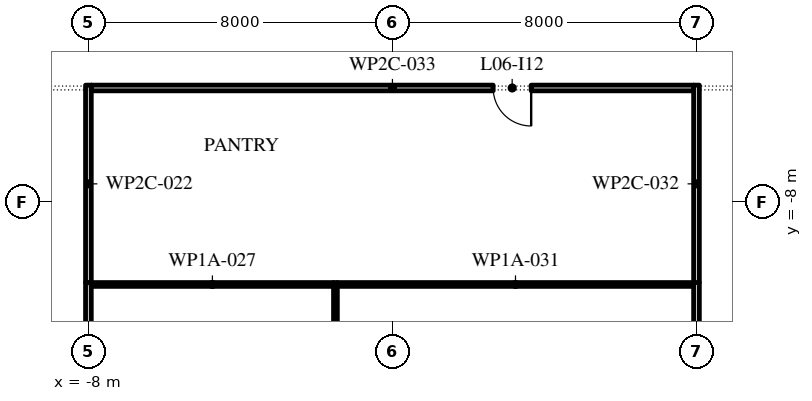
"""IFC4 building model, lengths in metres.
Left out: names, types, materials, properties, quantities, classifications, styles, units other than length and angle.
Written with IfcOpenShell. Run it as: python <this file> out.ifc"""

import sys

from ifc_helpers import new_model, si_unit, direction, frame, frame_2d, origin, place, context, subcontext, project, spatial, rectangle, extrude, element, fill, save


model = new_model("IFC4")
c1 = context("Model", 3, precision=1e-05, world=origin(), true_north=direction((0.0, 1.0)))
c2 = subcontext(c1, "Body", "Model", "MODEL_VIEW")
j1 = project(units=[si_unit("LENGTHUNIT", "METRE"), si_unit("PLANEANGLEUNIT", "RADIAN")], contexts=[c1])
p1 = place(None, origin())
s1 = spatial("IfcSite", under=j1, at=p1, CompositionType="ELEMENT")
p2 = place(p1, origin())
s2 = spatial("IfcBuilding", under=s1, at=p2, CompositionType="ELEMENT")
p3 = place(p2, frame((0.0, 0.0, 33.6)))
s3 = spatial("IfcBuildingStorey", under=s2, at=p3, CompositionType="ELEMENT", Elevation=33.6)
p4 = place(p3, frame((-8.0, -10.12, 0.0), z_axis=(0.0, 0.0, 1.0), x_axis=(0.0, -1.0, 0.0)))
e1 = element("IfcWall", 1, at=p4, inside=s3, PredefinedType="PARTITIONING", context=c2, shape_type="SweptSolid", body=[
    extrude(rectangle(XDim=7.805, YDim=0.15, at=frame_2d((3.902, 0.0))), origin(), (0.0, 0.0, 1.0), 5.8),
])
p5 = place(p4, frame((4.98, 0.0, 0.0)))
e2 = element("IfcOpeningElement", 2, at=p5, cuts=e1, PredefinedType="OPENING", context=c2, shape_type="SweptSolid", body=[
    extrude(rectangle(XDim=1.0, YDim=2.1, at=frame_2d((0.5, 1.05))), frame((0.0, 0.085, 0.0), z_axis=(0.0, -1.0, 0.0), x_axis=(1.0, 0.0, 0.0)), (0.0, 0.0, 1.0), 0.17),
])
p6 = place(p3, frame((-8.0, -4.925, 0.0), z_axis=(0.0, 0.0, 1.0), x_axis=(0.0, -1.0, 0.0)))
e3 = element("IfcWall", 3, at=p6, inside=s3, PredefinedType="PARTITIONING", context=c2, shape_type="SweptSolid", body=[
    extrude(rectangle(XDim=5.195, YDim=0.15, at=frame_2d((2.598, 0.0))), origin(), (0.0, 0.0, 1.0), 5.8),
])
p7 = place(p3, frame((-1.5, -21.95, 0.0), z_axis=(0.0, 0.0, 1.0), x_axis=(0.0, 1.0, 0.0)))
e4 = element("IfcWall", 4, at=p7, inside=s3, PredefinedType="PARTITIONING", context=c2, shape_type="SweptSolid", body=[
    extrude(rectangle(XDim=11.83, YDim=0.1, at=frame_2d((5.915, 0.0))), origin(), (0.0, 0.0, 1.0), 5.8),
])
p8 = place(p3, frame((-1.55, -10.17, 0.0), z_axis=(0.0, 0.0, 1.0), x_axis=(-1.0, 0.0, 0.0)))
e5 = element("IfcWall", 5, at=p8, inside=s3, PredefinedType="PARTITIONING", context=c2, shape_type="SweptSolid", body=[
    extrude(rectangle(XDim=6.375, YDim=0.1, at=frame_2d((3.188, 0.0))), origin(), (0.0, 0.0, 1.0), 5.8),
])
p9 = place(p3, frame((8.0, -18.075, 0.0), z_axis=(0.0, 0.0, 1.0), x_axis=(0.0, 1.0, 0.0)))
e6 = element("IfcWall", 6, at=p9, inside=s3, PredefinedType="PARTITIONING", context=c2, shape_type="SweptSolid", body=[
    extrude(rectangle(XDim=7.955, YDim=0.15, at=frame_2d((3.978, 0.0))), origin(), (0.0, 0.0, 1.0), 5.8),
])
p10 = place(p9, frame((5.005, 0.0, 0.0)))
e7 = element("IfcOpeningElement", 7, at=p10, cuts=e6, PredefinedType="OPENING", context=c2, shape_type="SweptSolid", body=[
    extrude(rectangle(XDim=1.0, YDim=2.1, at=frame_2d((0.5, 1.05))), frame((0.0, 0.085, 0.0), z_axis=(0.0, -1.0, 0.0), x_axis=(1.0, 0.0, 0.0)), (0.0, 0.0, 1.0), 0.17),
])
p11 = place(p3, frame((7.925, -10.17, 0.0), z_axis=(0.0, 0.0, 1.0), x_axis=(-1.0, 0.0, 0.0)))
e8 = element("IfcWall", 8, at=p11, inside=s3, PredefinedType="PARTITIONING", context=c2, shape_type="SweptSolid", body=[
    extrude(rectangle(XDim=9.375, YDim=0.1, at=frame_2d((4.688, 0.0))), origin(), (0.0, 0.0, 1.0), 5.8),
])
p12 = place(p3, frame((8.0, -10.12, 0.0), z_axis=(0.0, 0.0, 1.0), x_axis=(0.0, 1.0, 0.0)))
e9 = element("IfcWall", 9, at=p12, inside=s3, PredefinedType="PARTITIONING", context=c2, shape_type="SweptSolid", body=[
    extrude(rectangle(XDim=5.195, YDim=0.15, at=frame_2d((2.598, 0.0))), origin(), (0.0, 0.0, 1.0), 5.8),
])
p13 = place(p3, frame((7.925, -5.0, 0.0), z_axis=(0.0, 0.0, 1.0), x_axis=(-1.0, 0.0, 0.0)))
e10 = element("IfcWall", 10, at=p13, inside=s3, PredefinedType="PARTITIONING", context=c2, shape_type="SweptSolid", body=[
    extrude(rectangle(XDim=15.85, YDim=0.15, at=frame_2d((7.925, 0.0))), origin(), (0.0, 0.0, 1.0), 5.8),
])
p14 = place(p13, frame((4.275, 0.0, 0.0)))
e11 = element("IfcOpeningElement", 11, at=p14, cuts=e10, PredefinedType="OPENING", context=c2, shape_type="SweptSolid", body=[
    extrude(rectangle(XDim=1.0, YDim=2.1, at=frame_2d((0.5, 1.05))), frame((0.0, 0.085, 0.0), z_axis=(0.0, -1.0, 0.0), x_axis=(1.0, 0.0, 0.0)), (0.0, 0.0, 1.0), 0.17),
])
p15 = place(p14, origin())
e12 = element("IfcDoor", 12, at=p15, inside=s3, OperationType="SINGLE_SWING_RIGHT", PredefinedType="DOOR", context=c2, shape_type="SweptSolid", body=[
    extrude(rectangle(XDim=1.0, YDim=2.1, at=frame_2d((0.5, 1.05))), frame((0.0, 0.025, 0.0), z_axis=(0.0, -1.0, 0.0), x_axis=(1.0, 0.0, 0.0)), (0.0, 0.0, 1.0), 0.05),
])
fill(e11, e12)
save(model, sys.argv[1])
